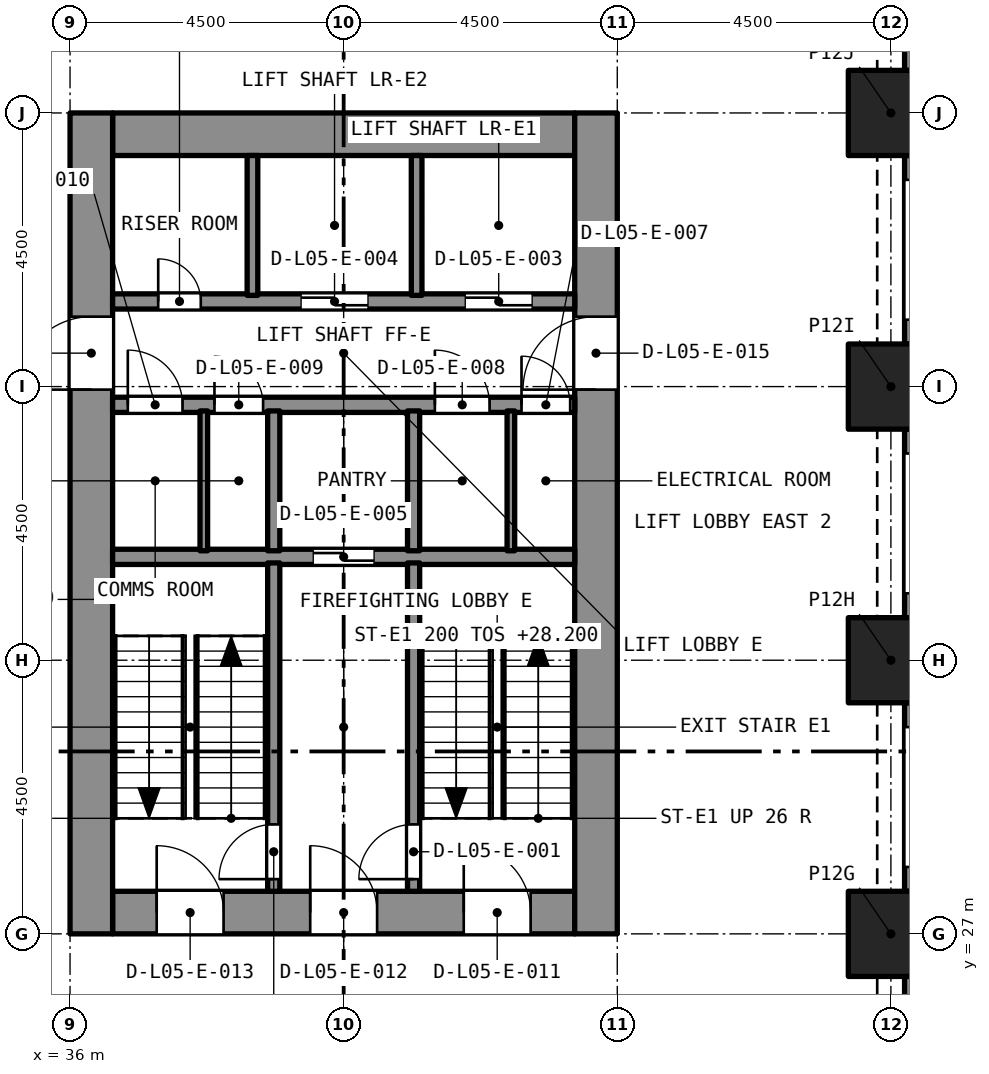
"""IFC4 building model, lengths in metres.
Left out: names, types, materials, properties, quantities, classifications, styles, units other than length and angle.
Written with IfcOpenShell. Run it as: python <this file> out.ifc"""

import sys

from ifc_helpers import new_model, si_unit, direction, frame, frame_2d, origin, origin_2d, place, context, subcontext, project, spatial, rectangle, extrude, element, fill, save


model = new_model("IFC4")
c1 = context("Model", 3, precision=1e-05, world=origin(), true_north=direction((0.0, 1.0)))
c2 = subcontext(c1, "Body", "Model", "MODEL_VIEW")
j1 = project(units=[si_unit("LENGTHUNIT", "METRE"), si_unit("PLANEANGLEUNIT", "RADIAN")], contexts=[c1])
p1 = place(None, origin())
s1 = spatial("IfcSite", under=j1, at=p1, CompositionType="ELEMENT")
p2 = place(p1, origin())
s2 = spatial("IfcBuilding", under=s1, at=p2, CompositionType="ELEMENT")
p3 = place(p2, frame((0.0, 0.0, 26.0)))
s3 = spatial("IfcBuildingStorey", under=s2, at=p3, CompositionType="ELEMENT", Elevation=26.0)
for number, where, z_axis, x_axis in (
    (1, (49.5, 27.0, 0.0), (0.0, 0.0, 1.0), (1.0, 0.0, 0.0)),
    (2, (49.5, 31.5, 0.0), (0.0, 0.0, 1.0), (1.0, 0.0, 0.0)),
    (3, (49.5, 36.0, 0.0), (0.0, 0.0, 1.0), (1.0, 0.0, 0.0)),
    (4, (49.5, 40.5, 0.0), (0.0, 0.0, 1.0), (1.0, 0.0, 0.0)),
):
    element("IfcColumn", number, at=place(p3, frame(where, z_axis=z_axis, x_axis=x_axis)), inside=s3, PredefinedType="COLUMN", context=c2, shape_type="SweptSolid", body=[
        extrude(rectangle(XDim=1.4, YDim=1.4, at=origin_2d()), origin(), (0.0, 0.0, 1.0), 4.4),
    ])
p4 = place(p3, frame((36.7, 27.35, 0.0), z_axis=(0.0, 0.0, 1.0), x_axis=(1.0, 0.0, 0.0)))
e5 = element("IfcWall", 5, at=p4, inside=s3, PredefinedType="SOLIDWALL", context=c2, shape_type="SweptSolid", body=[
    extrude(rectangle(XDim=7.6, YDim=0.7, at=frame_2d((3.8, 0.0))), origin(), (0.0, 0.0, 1.0), 4.4),
])
p5 = place(p4, frame((5.775, 0.0, 0.0)))
e6 = element("IfcOpeningElement", 6, at=p5, cuts=e5, PredefinedType="OPENING", context=c2, shape_type="SweptSolid", body=[
    extrude(rectangle(XDim=1.1, YDim=2.1, at=frame_2d((0.55, 1.05))), frame((0.0, 0.36, 0.0), z_axis=(0.0, -1.0, 0.0), x_axis=(1.0, 0.0, 0.0)), (0.0, 0.0, 1.0), 0.72),
])
p6 = place(p4, frame((3.25, 0.0, 0.0)))
e7 = element("IfcOpeningElement", 7, at=p6, cuts=e5, PredefinedType="OPENING", context=c2, shape_type="SweptSolid", body=[
    extrude(rectangle(XDim=1.1, YDim=2.1, at=frame_2d((0.55, 1.05))), frame((0.0, 0.36, 0.0), z_axis=(0.0, -1.0, 0.0), x_axis=(1.0, 0.0, 0.0)), (0.0, 0.0, 1.0), 0.72),
])
p7 = place(p4, frame((0.725, 0.0, 0.0)))
e8 = element("IfcOpeningElement", 8, at=p7, cuts=e5, PredefinedType="OPENING", context=c2, shape_type="SweptSolid", body=[
    extrude(rectangle(XDim=1.1, YDim=2.1, at=frame_2d((0.55, 1.05))), frame((0.0, 0.36, 0.0), z_axis=(0.0, -1.0, 0.0), x_axis=(1.0, 0.0, 0.0)), (0.0, 0.0, 1.0), 0.72),
])
p8 = place(p3, frame((36.7, 40.15, 0.0), z_axis=(0.0, 0.0, 1.0), x_axis=(1.0, 0.0, 0.0)))
e9 = element("IfcWall", 9, at=p8, inside=s3, PredefinedType="SOLIDWALL", context=c2, shape_type="SweptSolid", body=[
    extrude(rectangle(XDim=7.6, YDim=0.7, at=frame_2d((3.8, 0.0))), origin(), (0.0, 0.0, 1.0), 4.4),
])
p9 = place(p3, frame((36.35, 27.0, 0.0), z_axis=(0.0, 0.0, 1.0), x_axis=(0.0, 1.0, 0.0)))
e10 = element("IfcWall", 10, at=p9, inside=s3, PredefinedType="SOLIDWALL", context=c2, shape_type="SweptSolid", body=[
    extrude(rectangle(XDim=13.5, YDim=0.7, at=frame_2d((6.75, 0.0))), origin(), (0.0, 0.0, 1.0), 4.4),
])
p10 = place(p9, frame((8.95, 0.0, 0.0)))
e11 = element("IfcOpeningElement", 11, at=p10, cuts=e10, PredefinedType="OPENING", context=c2, shape_type="SweptSolid", body=[
    extrude(rectangle(XDim=1.2, YDim=2.1, at=frame_2d((0.6, 1.05))), frame((0.0, 0.36, 0.0), z_axis=(0.0, -1.0, 0.0), x_axis=(1.0, 0.0, 0.0)), (0.0, 0.0, 1.0), 0.72),
])
p11 = place(p3, frame((44.65, 27.0, 0.0), z_axis=(0.0, 0.0, 1.0), x_axis=(0.0, 1.0, 0.0)))
e12 = element("IfcWall", 12, at=p11, inside=s3, PredefinedType="SOLIDWALL", context=c2, shape_type="SweptSolid", body=[
    extrude(rectangle(XDim=13.5, YDim=0.7, at=frame_2d((6.75, 0.0))), origin(), (0.0, 0.0, 1.0), 4.4),
])
p12 = place(p11, frame((8.95, 0.0, 0.0)))
e13 = element("IfcOpeningElement", 13, at=p12, cuts=e12, PredefinedType="OPENING", context=c2, shape_type="SweptSolid", body=[
    extrude(rectangle(XDim=1.2, YDim=2.1, at=frame_2d((0.6, 1.05))), frame((0.0, 0.36, 0.0), z_axis=(0.0, -1.0, 0.0), x_axis=(1.0, 0.0, 0.0)), (0.0, 0.0, 1.0), 0.72),
])
p13 = place(p3, frame((49.875, 26.3, 0.0), z_axis=(0.0, 0.0, 1.0), x_axis=(0.0, -1.0, 0.0)))
e14 = element("IfcWall", 14, at=p13, inside=s3, PredefinedType="SOLIDWALL", context=c2, shape_type="SweptSolid", body=[
    extrude(rectangle(XDim=3.1, YDim=0.3, at=frame_2d((1.55, 0.0))), origin(), (0.0, 0.0, 1.0), 4.4),
])
p14 = place(p13, frame((0.4, 0.0, 0.45)))
e15 = element("IfcOpeningElement", 15, at=p14, cuts=e14, PredefinedType="OPENING", context=c2, shape_type="SweptSolid", body=[
    extrude(rectangle(XDim=2.3, YDim=2.55, at=frame_2d((1.15, 1.275))), frame((0.0, 0.16, 0.0), z_axis=(0.0, -1.0, 0.0), x_axis=(1.0, 0.0, 0.0)), (0.0, 0.0, 1.0), 0.32),
])
p15 = place(p3, frame((49.875, 30.8, 0.0), z_axis=(0.0, 0.0, 1.0), x_axis=(0.0, -1.0, 0.0)))
e16 = element("IfcWall", 16, at=p15, inside=s3, PredefinedType="SOLIDWALL", context=c2, shape_type="SweptSolid", body=[
    extrude(rectangle(XDim=3.1, YDim=0.3, at=frame_2d((1.55, 0.0))), origin(), (0.0, 0.0, 1.0), 4.4),
])
p16 = place(p15, frame((0.4, 0.0, 0.45)))
e17 = element("IfcOpeningElement", 17, at=p16, cuts=e16, PredefinedType="OPENING", context=c2, shape_type="SweptSolid", body=[
    extrude(rectangle(XDim=2.3, YDim=2.55, at=frame_2d((1.15, 1.275))), frame((0.0, 0.16, 0.0), z_axis=(0.0, -1.0, 0.0), x_axis=(1.0, 0.0, 0.0)), (0.0, 0.0, 1.0), 0.32),
])
p17 = place(p3, frame((49.875, 35.3, 0.0), z_axis=(0.0, 0.0, 1.0), x_axis=(0.0, -1.0, 0.0)))
e18 = element("IfcWall", 18, at=p17, inside=s3, PredefinedType="SOLIDWALL", context=c2, shape_type="SweptSolid", body=[
    extrude(rectangle(XDim=3.1, YDim=0.3, at=frame_2d((1.55, 0.0))), origin(), (0.0, 0.0, 1.0), 4.4),
])
p18 = place(p17, frame((0.4, 0.0, 0.45)))
e19 = element("IfcOpeningElement", 19, at=p18, cuts=e18, PredefinedType="OPENING", context=c2, shape_type="SweptSolid", body=[
    extrude(rectangle(XDim=2.3, YDim=2.55, at=frame_2d((1.15, 1.275))), frame((0.0, 0.16, 0.0), z_axis=(0.0, -1.0, 0.0), x_axis=(1.0, 0.0, 0.0)), (0.0, 0.0, 1.0), 0.32),
])
p19 = place(p3, frame((49.875, 39.8, 0.0), z_axis=(0.0, 0.0, 1.0), x_axis=(0.0, -1.0, 0.0)))
e20 = element("IfcWall", 20, at=p19, inside=s3, PredefinedType="SOLIDWALL", context=c2, shape_type="SweptSolid", body=[
    extrude(rectangle(XDim=3.1, YDim=0.3, at=frame_2d((1.55, 0.0))), origin(), (0.0, 0.0, 1.0), 4.4),
])
p20 = place(p19, frame((0.4, 0.0, 0.45)))
e21 = element("IfcOpeningElement", 21, at=p20, cuts=e20, PredefinedType="OPENING", context=c2, shape_type="SweptSolid", body=[
    extrude(rectangle(XDim=2.3, YDim=2.55, at=frame_2d((1.15, 1.275))), frame((0.0, 0.16, 0.0), z_axis=(0.0, -1.0, 0.0), x_axis=(1.0, 0.0, 0.0)), (0.0, 0.0, 1.0), 0.32),
])
p21 = place(p3, frame((49.875, 44.3, 0.0), z_axis=(0.0, 0.0, 1.0), x_axis=(0.0, -1.0, 0.0)))
e22 = element("IfcWall", 22, at=p21, inside=s3, PredefinedType="SOLIDWALL", context=c2, shape_type="SweptSolid", body=[
    extrude(rectangle(XDim=3.1, YDim=0.3, at=frame_2d((1.55, 0.0))), origin(), (0.0, 0.0, 1.0), 4.4),
])
p22 = place(p21, frame((0.4, 0.0, 0.45)))
e23 = element("IfcOpeningElement", 23, at=p22, cuts=e22, PredefinedType="OPENING", context=c2, shape_type="SweptSolid", body=[
    extrude(rectangle(XDim=2.3, YDim=2.55, at=frame_2d((1.15, 1.275))), frame((0.0, 0.16, 0.0), z_axis=(0.0, -1.0, 0.0), x_axis=(1.0, 0.0, 0.0)), (0.0, 0.0, 1.0), 0.32),
])
p23 = place(p3, frame((36.7, 33.2, 0.0), z_axis=(0.0, 0.0, 1.0), x_axis=(1.0, 0.0, 0.0)))
e24 = element("IfcWall", 24, at=p23, inside=s3, PredefinedType="SOLIDWALL", context=c2, shape_type="SweptSolid", body=[
    extrude(rectangle(XDim=7.6, YDim=0.25, at=frame_2d((3.8, 0.0))), origin(), (0.0, 0.0, 1.0), 4.1),
])
p24 = place(p23, frame((3.3, 0.0, 0.0)))
e25 = element("IfcOpeningElement", 25, at=p24, cuts=e24, PredefinedType="OPENING", context=c2, shape_type="SweptSolid", body=[
    extrude(rectangle(XDim=1.0, YDim=2.1, at=frame_2d((0.5, 1.05))), frame((0.0, 0.135, 0.0), z_axis=(0.0, -1.0, 0.0), x_axis=(1.0, 0.0, 0.0)), (0.0, 0.0, 1.0), 0.27),
])
p25 = place(p3, frame((36.7, 35.7, 0.0), z_axis=(0.0, 0.0, 1.0), x_axis=(1.0, 0.0, 0.0)))
e26 = element("IfcWall", 26, at=p25, inside=s3, PredefinedType="SOLIDWALL", context=c2, shape_type="SweptSolid", body=[
    extrude(rectangle(XDim=7.6, YDim=0.25, at=frame_2d((3.8, 0.0))), origin(), (0.0, 0.0, 1.0), 4.1),
])
p26 = place(p25, frame((6.725, 0.0, 0.0)))
e27 = element("IfcOpeningElement", 27, at=p26, cuts=e26, PredefinedType="OPENING", context=c2, shape_type="SweptSolid", body=[
    extrude(rectangle(XDim=0.8, YDim=2.1, at=frame_2d((0.4, 1.05))), frame((0.0, 0.135, 0.0), z_axis=(0.0, -1.0, 0.0), x_axis=(1.0, 0.0, 0.0)), (0.0, 0.0, 1.0), 0.27),
])
p27 = place(p25, frame((5.3, 0.0, 0.0)))
e28 = element("IfcOpeningElement", 28, at=p27, cuts=e26, PredefinedType="OPENING", context=c2, shape_type="SweptSolid", body=[
    extrude(rectangle(XDim=0.9, YDim=2.1, at=frame_2d((0.45, 1.05))), frame((0.0, 0.135, 0.0), z_axis=(0.0, -1.0, 0.0), x_axis=(1.0, 0.0, 0.0)), (0.0, 0.0, 1.0), 0.27),
])
p28 = place(p25, frame((1.675, 0.0, 0.0)))
e29 = element("IfcOpeningElement", 29, at=p28, cuts=e26, PredefinedType="OPENING", context=c2, shape_type="SweptSolid", body=[
    extrude(rectangle(XDim=0.8, YDim=2.1, at=frame_2d((0.4, 1.05))), frame((0.0, 0.135, 0.0), z_axis=(0.0, -1.0, 0.0), x_axis=(1.0, 0.0, 0.0)), (0.0, 0.0, 1.0), 0.27),
])
p29 = place(p25, frame((0.25, 0.0, 0.0)))
e30 = element("IfcOpeningElement", 30, at=p29, cuts=e26, PredefinedType="OPENING", context=c2, shape_type="SweptSolid", body=[
    extrude(rectangle(XDim=0.9, YDim=2.1, at=frame_2d((0.45, 1.05))), frame((0.0, 0.135, 0.0), z_axis=(0.0, -1.0, 0.0), x_axis=(1.0, 0.0, 0.0)), (0.0, 0.0, 1.0), 0.27),
])
p30 = place(p3, frame((36.7, 37.4, 0.0), z_axis=(0.0, 0.0, 1.0), x_axis=(1.0, 0.0, 0.0)))
e31 = element("IfcWall", 31, at=p30, inside=s3, PredefinedType="SOLIDWALL", context=c2, shape_type="SweptSolid", body=[
    extrude(rectangle(XDim=7.6, YDim=0.25, at=frame_2d((3.8, 0.0))), origin(), (0.0, 0.0, 1.0), 4.1),
])
p31 = place(p30, frame((5.8, 0.0, 0.0)))
e32 = element("IfcOpeningElement", 32, at=p31, cuts=e31, PredefinedType="OPENING", context=c2, shape_type="SweptSolid", body=[
    extrude(rectangle(XDim=1.1, YDim=2.4, at=frame_2d((0.55, 1.2))), frame((0.0, 0.135, 0.0), z_axis=(0.0, -1.0, 0.0), x_axis=(1.0, 0.0, 0.0)), (0.0, 0.0, 1.0), 0.27),
])
p32 = place(p30, frame((3.1, 0.0, 0.0)))
e33 = element("IfcOpeningElement", 33, at=p32, cuts=e31, PredefinedType="OPENING", context=c2, shape_type="SweptSolid", body=[
    extrude(rectangle(XDim=1.1, YDim=2.4, at=frame_2d((0.55, 1.2))), frame((0.0, 0.135, 0.0), z_axis=(0.0, -1.0, 0.0), x_axis=(1.0, 0.0, 0.0)), (0.0, 0.0, 1.0), 0.27),
])
p33 = place(p30, frame((0.75, 0.0, 0.0)))
e34 = element("IfcOpeningElement", 34, at=p33, cuts=e31, PredefinedType="OPENING", context=c2, shape_type="SweptSolid", body=[
    extrude(rectangle(XDim=0.7, YDim=2.1, at=frame_2d((0.35, 1.05))), frame((0.0, 0.135, 0.0), z_axis=(0.0, -1.0, 0.0), x_axis=(1.0, 0.0, 0.0)), (0.0, 0.0, 1.0), 0.27),
])
p34 = place(p3, frame((41.65, 27.7, 0.0), z_axis=(0.0, 0.0, 1.0), x_axis=(0.0, 1.0, 0.0)))
e35 = element("IfcWall", 35, at=p34, inside=s3, PredefinedType="SOLIDWALL", context=c2, shape_type="SweptSolid", body=[
    extrude(rectangle(XDim=5.4, YDim=0.2, at=frame_2d((2.7, 0.0))), origin(), (0.0, 0.0, 1.0), 4.1),
])
p35 = place(p34, frame((0.2, 0.0, 0.0)))
e36 = element("IfcOpeningElement", 36, at=p35, cuts=e35, PredefinedType="OPENING", context=c2, shape_type="SweptSolid", body=[
    extrude(rectangle(XDim=0.9, YDim=2.1, at=frame_2d((0.45, 1.05))), frame((0.0, 0.11, 0.0), z_axis=(0.0, -1.0, 0.0), x_axis=(1.0, 0.0, 0.0)), (0.0, 0.0, 1.0), 0.22),
])
p36 = place(p3, frame((39.35, 27.7, 0.0), z_axis=(0.0, 0.0, 1.0), x_axis=(0.0, 1.0, 0.0)))
e37 = element("IfcWall", 37, at=p36, inside=s3, PredefinedType="SOLIDWALL", context=c2, shape_type="SweptSolid", body=[
    extrude(rectangle(XDim=5.4, YDim=0.2, at=frame_2d((2.7, 0.0))), origin(), (0.0, 0.0, 1.0), 4.1),
])
p37 = place(p36, frame((0.2, 0.0, 0.0)))
e38 = element("IfcOpeningElement", 38, at=p37, cuts=e37, PredefinedType="OPENING", context=c2, shape_type="SweptSolid", body=[
    extrude(rectangle(XDim=0.9, YDim=2.1, at=frame_2d((0.45, 1.05))), frame((0.0, 0.11, 0.0), z_axis=(0.0, -1.0, 0.0), x_axis=(1.0, 0.0, 0.0)), (0.0, 0.0, 1.0), 0.22),
])
for number, where, z_axis, x_axis in (
    (39, (41.65, 33.3, 0.0), (0.0, 0.0, 1.0), (0.0, 1.0, 0.0)),
    (40, (39.35, 33.3, 0.0), (0.0, 0.0, 1.0), (0.0, 1.0, 0.0)),
):
    element("IfcWall", number, at=place(p3, frame(where, z_axis=z_axis, x_axis=x_axis)), inside=s3, PredefinedType="SOLIDWALL", context=c2, shape_type="SweptSolid", body=[
        extrude(rectangle(XDim=2.3, YDim=0.2, at=frame_2d((1.15, 0.0))), origin(), (0.0, 0.0, 1.0), 4.1),
    ])
for number, where, z_axis, x_axis in (
    (41, (41.7, 37.5, 0.0), (0.0, 0.0, 1.0), (0.0, 1.0, 0.0)),
    (42, (39.0, 37.5, 0.0), (0.0, 0.0, 1.0), (0.0, 1.0, 0.0)),
):
    element("IfcWall", number, at=place(p3, frame(where, z_axis=z_axis, x_axis=x_axis)), inside=s3, PredefinedType="SOLIDWALL", context=c2, shape_type="SweptSolid", body=[
        extrude(rectangle(XDim=2.3, YDim=0.175, at=frame_2d((1.15, 0.0))), origin(), (0.0, 0.0, 1.0), 4.1),
    ])
for number, where, z_axis, x_axis in (
    (43, (43.25, 33.3, 0.0), (0.0, 0.0, 1.0), (0.0, 1.0, 0.0)),
    (44, (38.2, 33.3, 0.0), (0.0, 0.0, 1.0), (0.0, 1.0, 0.0)),
):
    element("IfcWall", number, at=place(p3, frame(where, z_axis=z_axis, x_axis=x_axis)), inside=s3, PredefinedType="PARTITIONING", context=c2, shape_type="SweptSolid", body=[
        extrude(rectangle(XDim=2.3, YDim=0.125, at=frame_2d((1.15, 0.0))), origin(), (0.0, 0.0, 1.0), 4.1),
    ])
p38 = place(p35, origin())
e45 = element("IfcDoor", 45, at=p38, inside=s3, OperationType="SINGLE_SWING_LEFT", PredefinedType="DOOR", context=c2, shape_type="SweptSolid", body=[
    extrude(rectangle(XDim=0.9, YDim=2.1, at=frame_2d((0.45, 1.05))), frame((0.0, 0.025, 0.0), z_axis=(0.0, -1.0, 0.0), x_axis=(1.0, 0.0, 0.0)), (0.0, 0.0, 1.0), 0.05),
])
fill(e36, e45)
p39 = place(p37, origin())
e46 = element("IfcDoor", 46, at=p39, inside=s3, OperationType="SINGLE_SWING_LEFT", PredefinedType="DOOR", context=c2, shape_type="SweptSolid", body=[
    extrude(rectangle(XDim=0.9, YDim=2.1, at=frame_2d((0.45, 1.05))), frame((0.0, 0.025, 0.0), z_axis=(0.0, -1.0, 0.0), x_axis=(1.0, 0.0, 0.0)), (0.0, 0.0, 1.0), 0.05),
])
fill(e38, e46)
p40 = place(p31, origin())
e47 = element("IfcDoor", 47, at=p40, inside=s3, OperationType="SLIDING_TO_LEFT", PredefinedType="DOOR", context=c2, shape_type="SweptSolid", body=[
    extrude(rectangle(XDim=1.1, YDim=2.4, at=frame_2d((0.55, 1.2))), frame((0.0, 0.025, 0.0), z_axis=(0.0, -1.0, 0.0), x_axis=(1.0, 0.0, 0.0)), (0.0, 0.0, 1.0), 0.05),
])
fill(e32, e47)
p41 = place(p32, origin())
e48 = element("IfcDoor", 48, at=p41, inside=s3, OperationType="SLIDING_TO_LEFT", PredefinedType="DOOR", context=c2, shape_type="SweptSolid", body=[
    extrude(rectangle(XDim=1.1, YDim=2.4, at=frame_2d((0.55, 1.2))), frame((0.0, 0.025, 0.0), z_axis=(0.0, -1.0, 0.0), x_axis=(1.0, 0.0, 0.0)), (0.0, 0.0, 1.0), 0.05),
])
fill(e33, e48)
p42 = place(p24, origin())
e49 = element("IfcDoor", 49, at=p42, inside=s3, OperationType="SLIDING_TO_LEFT", PredefinedType="DOOR", context=c2, shape_type="SweptSolid", body=[
    extrude(rectangle(XDim=1.0, YDim=2.1, at=frame_2d((0.5, 1.05))), frame((0.0, 0.025, 0.0), z_axis=(0.0, -1.0, 0.0), x_axis=(1.0, 0.0, 0.0)), (0.0, 0.0, 1.0), 0.05),
])
fill(e25, e49)
p43 = place(p33, origin())
e50 = element("IfcDoor", 50, at=p43, inside=s3, OperationType="SINGLE_SWING_LEFT", PredefinedType="DOOR", context=c2, shape_type="SweptSolid", body=[
    extrude(rectangle(XDim=0.7, YDim=2.1, at=frame_2d((0.35, 1.05))), frame((0.0, 0.025, 0.0), z_axis=(0.0, -1.0, 0.0), x_axis=(1.0, 0.0, 0.0)), (0.0, 0.0, 1.0), 0.05),
])
fill(e34, e50)
p44 = place(p26, origin())
e51 = element("IfcDoor", 51, at=p44, inside=s3, OperationType="SINGLE_SWING_LEFT", PredefinedType="DOOR", context=c2, shape_type="SweptSolid", body=[
    extrude(rectangle(XDim=0.8, YDim=2.1, at=frame_2d((0.4, 1.05))), frame((0.0, 0.025, 0.0), z_axis=(0.0, -1.0, 0.0), x_axis=(1.0, 0.0, 0.0)), (0.0, 0.0, 1.0), 0.05),
])
fill(e27, e51)
p45 = place(p27, origin())
e52 = element("IfcDoor", 52, at=p45, inside=s3, OperationType="SINGLE_SWING_LEFT", PredefinedType="DOOR", context=c2, shape_type="SweptSolid", body=[
    extrude(rectangle(XDim=0.9, YDim=2.1, at=frame_2d((0.45, 1.05))), frame((0.0, 0.025, 0.0), z_axis=(0.0, -1.0, 0.0), x_axis=(1.0, 0.0, 0.0)), (0.0, 0.0, 1.0), 0.05),
])
fill(e28, e52)
p46 = place(p28, origin())
e53 = element("IfcDoor", 53, at=p46, inside=s3, OperationType="SINGLE_SWING_LEFT", PredefinedType="DOOR", context=c2, shape_type="SweptSolid", body=[
    extrude(rectangle(XDim=0.8, YDim=2.1, at=frame_2d((0.4, 1.05))), frame((0.0, 0.025, 0.0), z_axis=(0.0, -1.0, 0.0), x_axis=(1.0, 0.0, 0.0)), (0.0, 0.0, 1.0), 0.05),
])
fill(e29, e53)
p47 = place(p29, origin())
e54 = element("IfcDoor", 54, at=p47, inside=s3, OperationType="SINGLE_SWING_LEFT", PredefinedType="DOOR", context=c2, shape_type="SweptSolid", body=[
    extrude(rectangle(XDim=0.9, YDim=2.1, at=frame_2d((0.45, 1.05))), frame((0.0, 0.025, 0.0), z_axis=(0.0, -1.0, 0.0), x_axis=(1.0, 0.0, 0.0)), (0.0, 0.0, 1.0), 0.05),
])
fill(e30, e54)
p48 = place(p5, origin())
e55 = element("IfcDoor", 55, at=p48, inside=s3, OperationType="SINGLE_SWING_LEFT", PredefinedType="DOOR", context=c2, shape_type="SweptSolid", body=[
    extrude(rectangle(XDim=1.1, YDim=2.1, at=frame_2d((0.55, 1.05))), frame((0.0, 0.025, 0.0), z_axis=(0.0, -1.0, 0.0), x_axis=(1.0, 0.0, 0.0)), (0.0, 0.0, 1.0), 0.05),
])
fill(e6, e55)
p49 = place(p6, origin())
e56 = element("IfcDoor", 56, at=p49, inside=s3, OperationType="SINGLE_SWING_LEFT", PredefinedType="DOOR", context=c2, shape_type="SweptSolid", body=[
    extrude(rectangle(XDim=1.1, YDim=2.1, at=frame_2d((0.55, 1.05))), frame((0.0, 0.025, 0.0), z_axis=(0.0, -1.0, 0.0), x_axis=(1.0, 0.0, 0.0)), (0.0, 0.0, 1.0), 0.05),
])
fill(e7, e56)
p50 = place(p7, origin())
e57 = element("IfcDoor", 57, at=p50, inside=s3, OperationType="SINGLE_SWING_LEFT", PredefinedType="DOOR", context=c2, shape_type="SweptSolid", body=[
    extrude(rectangle(XDim=1.1, YDim=2.1, at=frame_2d((0.55, 1.05))), frame((0.0, 0.025, 0.0), z_axis=(0.0, -1.0, 0.0), x_axis=(1.0, 0.0, 0.0)), (0.0, 0.0, 1.0), 0.05),
])
fill(e8, e57)
p51 = place(p10, origin())
e58 = element("IfcDoor", 58, at=p51, inside=s3, OperationType="SINGLE_SWING_LEFT", PredefinedType="DOOR", context=c2, shape_type="SweptSolid", body=[
    extrude(rectangle(XDim=1.2, YDim=2.1, at=frame_2d((0.6, 1.05))), frame((0.0, 0.025, 0.0), z_axis=(0.0, -1.0, 0.0), x_axis=(1.0, 0.0, 0.0)), (0.0, 0.0, 1.0), 0.05),
])
fill(e11, e58)
p52 = place(p12, origin())
e59 = element("IfcDoor", 59, at=p52, inside=s3, OperationType="SINGLE_SWING_LEFT", PredefinedType="DOOR", context=c2, shape_type="SweptSolid", body=[
    extrude(rectangle(XDim=1.2, YDim=2.1, at=frame_2d((0.6, 1.05))), frame((0.0, 0.025, 0.0), z_axis=(0.0, -1.0, 0.0), x_axis=(1.0, 0.0, 0.0)), (0.0, 0.0, 1.0), 0.05),
])
fill(e13, e59)
save(model, sys.argv[1])
